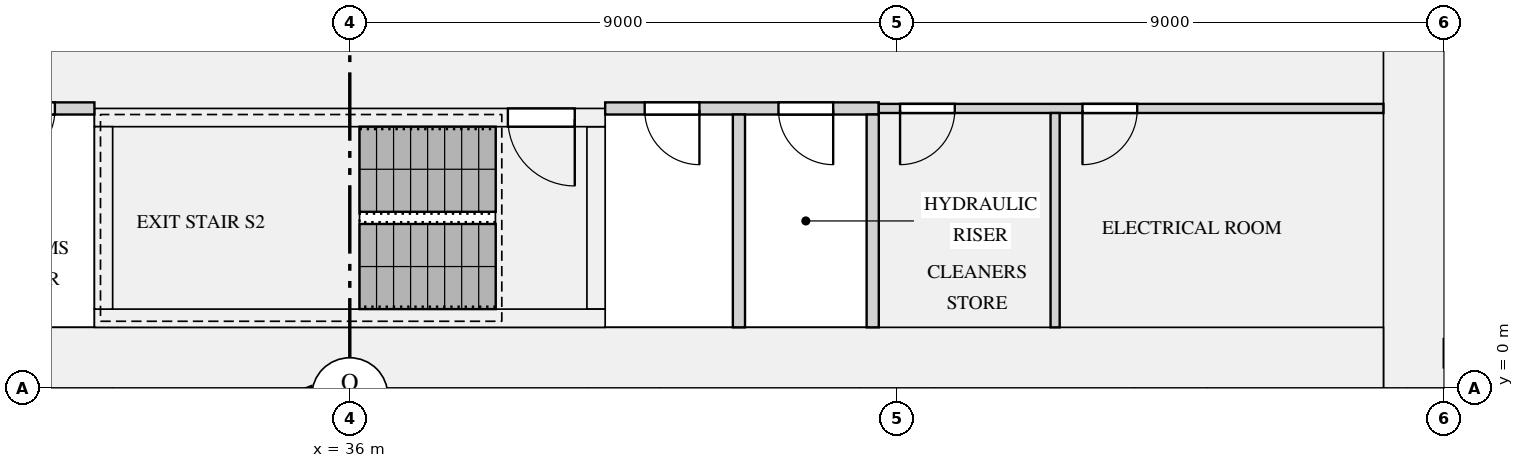
"""IFC4 building model, lengths in metres.
Left out: names, types, materials, properties, quantities, classifications, styles, units other than length and angle.
Written with IfcOpenShell. Run it as: python <this file> out.ifc"""

import sys

from ifc_helpers import new_model, si_unit, direction, frame, frame_2d, origin, place, context, subcontext, project, spatial, rectangle, extrude, element, fill, save


model = new_model("IFC4")
c1 = context("Model", 3, precision=1e-05, world=origin(), true_north=direction((0.0, 1.0)))
c2 = subcontext(c1, "Body", "Model", "MODEL_VIEW")
j1 = project(units=[si_unit("LENGTHUNIT", "METRE"), si_unit("PLANEANGLEUNIT", "RADIAN")], contexts=[c1])
p1 = place(None, origin())
s1 = spatial("IfcSite", under=j1, at=p1, CompositionType="ELEMENT")
p2 = place(p1, origin())
s2 = spatial("IfcBuilding", under=s1, at=p2, CompositionType="ELEMENT")
p3 = place(p2, frame((0.0, 0.0, 19.5)))
s3 = spatial("IfcBuildingStorey", under=s2, at=p3, CompositionType="ELEMENT", Elevation=19.5)
p4 = place(p3, frame((53.5, 0.0, 0.0), z_axis=(0.0, 0.0, 1.0), x_axis=(0.0, 1.0, 0.0)))
e1 = element("IfcWall", 1, at=p4, inside=s3, PredefinedType="SHEAR", context=c2, shape_type="SweptSolid", body=[
    extrude(rectangle(XDim=12.5, YDim=1.0, at=frame_2d((6.25, 0.0))), origin(), (0.0, 0.0, 1.0), 3.15),
])
p5 = place(p3, frame((19.0, 0.5, 0.0), z_axis=(0.0, 0.0, 1.0), x_axis=(1.0, 0.0, 0.0)))
e2 = element("IfcWall", 2, at=p5, inside=s3, PredefinedType="SHEAR", context=c2, shape_type="SweptSolid", body=[
    extrude(rectangle(XDim=34.0, YDim=1.0, at=frame_2d((17.0, 0.0))), origin(), (0.0, 0.0, 1.0), 3.15),
])
p6 = place(p3, frame((31.8, 1.15, 0.0), z_axis=(0.0, 0.0, 1.0), x_axis=(1.0, 0.0, 0.0)))
e3 = element("IfcWall", 3, at=p6, inside=s3, PredefinedType="SHEAR", context=c2, shape_type="SweptSolid", body=[
    extrude(rectangle(XDim=8.4, YDim=0.3, at=frame_2d((4.2, 0.0))), origin(), (0.0, 0.0, 1.0), 3.15),
])
p7 = place(p3, frame((31.8, 4.45, 0.0), z_axis=(0.0, 0.0, 1.0), x_axis=(1.0, 0.0, 0.0)))
e4 = element("IfcWall", 4, at=p7, inside=s3, PredefinedType="SHEAR", context=c2, shape_type="SweptSolid", body=[
    extrude(rectangle(XDim=8.4, YDim=0.3, at=frame_2d((4.2, 0.0))), origin(), (0.0, 0.0, 1.0), 3.15),
])
p8 = place(p7, frame((6.8, 0.0, 0.0)))
e5 = element("IfcOpeningElement", 5, at=p8, cuts=e4, PredefinedType="OPENING", context=c2, shape_type="SweptSolid", body=[
    extrude(rectangle(XDim=1.1, YDim=2.1, at=frame_2d((0.55, 1.05))), frame((0.0, 0.16, 0.0), z_axis=(0.0, -1.0, 0.0), x_axis=(1.0, 0.0, 0.0)), (0.0, 0.0, 1.0), 0.32),
])
for number, where, z_axis, x_axis in (
    (6, (31.95, 1.3, 0.0), (0.0, 0.0, 1.0), (0.0, 1.0, 0.0)),
    (7, (40.05, 1.3, 0.0), (0.0, 0.0, 1.0), (0.0, 1.0, 0.0)),
):
    element("IfcWall", number, at=place(p3, frame(where, z_axis=z_axis, x_axis=x_axis)), inside=s3, PredefinedType="SHEAR", context=c2, shape_type="SweptSolid", body=[
        extrude(rectangle(XDim=3.0, YDim=0.3, at=frame_2d((1.5, 0.0))), origin(), (0.0, 0.0, 1.0), 3.15),
    ])
p9 = place(p3, frame((27.3, 4.6, 0.0), z_axis=(0.0, 0.0, 1.0), x_axis=(1.0, 0.0, 0.0)))
e8 = element("IfcWall", 8, at=p9, inside=s3, PredefinedType="PARTITIONING", context=c2, shape_type="SweptSolid", body=[
    extrude(rectangle(XDim=4.5, YDim=0.2, at=frame_2d((2.25, 0.0))), origin(), (0.0, 0.0, 1.0), 2.83),
])
p10 = place(p9, frame((0.75, 0.0, 0.0)))
e9 = element("IfcOpeningElement", 9, at=p10, cuts=e8, PredefinedType="OPENING", context=c2, shape_type="SweptSolid", body=[
    extrude(rectangle(XDim=0.9, YDim=2.1, at=frame_2d((0.45, 1.05))), frame((0.0, 0.11, 0.0), z_axis=(0.0, -1.0, 0.0), x_axis=(1.0, 0.0, 0.0)), (0.0, 0.0, 1.0), 0.22),
])
p11 = place(p9, frame((2.95, 0.0, 0.0)))
e10 = element("IfcOpeningElement", 10, at=p11, cuts=e8, PredefinedType="OPENING", context=c2, shape_type="SweptSolid", body=[
    extrude(rectangle(XDim=0.9, YDim=2.1, at=frame_2d((0.45, 1.05))), frame((0.0, 0.11, 0.0), z_axis=(0.0, -1.0, 0.0), x_axis=(1.0, 0.0, 0.0)), (0.0, 0.0, 1.0), 0.22),
])
p12 = place(p3, frame((40.2, 4.6, 0.0), z_axis=(0.0, 0.0, 1.0), x_axis=(1.0, 0.0, 0.0)))
e11 = element("IfcWall", 11, at=p12, inside=s3, PredefinedType="PARTITIONING", context=c2, shape_type="SweptSolid", body=[
    extrude(rectangle(XDim=4.5, YDim=0.2, at=frame_2d((2.25, 0.0))), origin(), (0.0, 0.0, 1.0), 2.83),
])
p13 = place(p12, frame((0.65, 0.0, 0.0)))
e12 = element("IfcOpeningElement", 12, at=p13, cuts=e11, PredefinedType="OPENING", context=c2, shape_type="SweptSolid", body=[
    extrude(rectangle(XDim=0.9, YDim=2.1, at=frame_2d((0.45, 1.05))), frame((0.0, 0.11, 0.0), z_axis=(0.0, -1.0, 0.0), x_axis=(1.0, 0.0, 0.0)), (0.0, 0.0, 1.0), 0.22),
])
p14 = place(p12, frame((2.85, 0.0, 0.0)))
e13 = element("IfcOpeningElement", 13, at=p14, cuts=e11, PredefinedType="OPENING", context=c2, shape_type="SweptSolid", body=[
    extrude(rectangle(XDim=0.9, YDim=2.1, at=frame_2d((0.45, 1.05))), frame((0.0, 0.11, 0.0), z_axis=(0.0, -1.0, 0.0), x_axis=(1.0, 0.0, 0.0)), (0.0, 0.0, 1.0), 0.22),
])
p15 = place(p3, frame((44.7, 4.6, 0.0), z_axis=(0.0, 0.0, 1.0), x_axis=(1.0, 0.0, 0.0)))
e14 = element("IfcWall", 14, at=p15, inside=s3, PredefinedType="PARTITIONING", context=c2, shape_type="SweptSolid", body=[
    extrude(rectangle(XDim=8.3, YDim=0.15, at=frame_2d((4.15, 0.0))), origin(), (0.0, 0.0, 1.0), 2.83),
])
p16 = place(p15, frame((0.35, 0.0, 0.0)))
e15 = element("IfcOpeningElement", 15, at=p16, cuts=e14, PredefinedType="OPENING", context=c2, shape_type="SweptSolid", body=[
    extrude(rectangle(XDim=0.9, YDim=2.1, at=frame_2d((0.45, 1.05))), frame((0.0, 0.085, 0.0), z_axis=(0.0, -1.0, 0.0), x_axis=(1.0, 0.0, 0.0)), (0.0, 0.0, 1.0), 0.17),
])
p17 = place(p15, frame((3.35, 0.0, 0.0)))
e16 = element("IfcOpeningElement", 16, at=p17, cuts=e14, PredefinedType="OPENING", context=c2, shape_type="SweptSolid", body=[
    extrude(rectangle(XDim=0.9, YDim=2.1, at=frame_2d((0.45, 1.05))), frame((0.0, 0.085, 0.0), z_axis=(0.0, -1.0, 0.0), x_axis=(1.0, 0.0, 0.0)), (0.0, 0.0, 1.0), 0.17),
])
for number, where, z_axis, x_axis in (
    (17, (42.4, 1.0, 0.0), (0.0, 0.0, 1.0), (0.0, 1.0, 0.0)),
    (18, (44.6, 1.0, 0.0), (0.0, 0.0, 1.0), (0.0, 1.0, 0.0)),
):
    element("IfcWall", number, at=place(p3, frame(where, z_axis=z_axis, x_axis=x_axis)), inside=s3, PredefinedType="PARTITIONING", context=c2, shape_type="SweptSolid", body=[
        extrude(rectangle(XDim=3.5, YDim=0.2, at=frame_2d((1.75, 0.0))), origin(), (0.0, 0.0, 1.0), 2.83),
    ])
p18 = place(p3, frame((47.6, 1.0, 0.0), z_axis=(0.0, 0.0, 1.0), x_axis=(0.0, 1.0, 0.0)))
e19 = element("IfcWall", 19, at=p18, inside=s3, PredefinedType="PARTITIONING", context=c2, shape_type="SweptSolid", body=[
    extrude(rectangle(XDim=3.525, YDim=0.15, at=frame_2d((1.762, 0.0))), origin(), (0.0, 0.0, 1.0), 2.83),
])
p19 = place(p8, frame((1.1, 0.0, 0.0), z_axis=(0.0, 0.0, 1.0), x_axis=(-1.0, 0.0, 0.0)))
e20 = element("IfcDoor", 20, at=p19, inside=s3, OperationType="SINGLE_SWING_LEFT", PredefinedType="DOOR", context=c2, shape_type="SweptSolid", body=[
    extrude(rectangle(XDim=1.1, YDim=2.1, at=frame_2d((0.55, 1.05))), frame((0.0, 0.025, 0.0), z_axis=(0.0, -1.0, 0.0), x_axis=(1.0, 0.0, 0.0)), (0.0, 0.0, 1.0), 0.05),
])
fill(e5, e20)
p20 = place(p16, frame((0.9, 0.0, 0.0), z_axis=(0.0, 0.0, 1.0), x_axis=(-1.0, 0.0, 0.0)))
e21 = element("IfcDoor", 21, at=p20, inside=s3, OperationType="SINGLE_SWING_RIGHT", PredefinedType="DOOR", context=c2, shape_type="SweptSolid", body=[
    extrude(rectangle(XDim=0.9, YDim=2.1, at=frame_2d((0.45, 1.05))), frame((0.0, 0.025, 0.0), z_axis=(0.0, -1.0, 0.0), x_axis=(1.0, 0.0, 0.0)), (0.0, 0.0, 1.0), 0.05),
])
fill(e15, e21)
p21 = place(p17, frame((0.9, 0.0, 0.0), z_axis=(0.0, 0.0, 1.0), x_axis=(-1.0, 0.0, 0.0)))
e22 = element("IfcDoor", 22, at=p21, inside=s3, OperationType="SINGLE_SWING_RIGHT", PredefinedType="DOOR", context=c2, shape_type="SweptSolid", body=[
    extrude(rectangle(XDim=0.9, YDim=2.1, at=frame_2d((0.45, 1.05))), frame((0.0, 0.025, 0.0), z_axis=(0.0, -1.0, 0.0), x_axis=(1.0, 0.0, 0.0)), (0.0, 0.0, 1.0), 0.05),
])
fill(e16, e22)
p22 = place(p11, frame((0.9, 0.0, 0.0), z_axis=(0.0, 0.0, 1.0), x_axis=(-1.0, 0.0, 0.0)))
e23 = element("IfcDoor", 23, at=p22, inside=s3, OperationType="SINGLE_SWING_RIGHT", PredefinedType="DOOR", context=c2, shape_type="SweptSolid", body=[
    extrude(rectangle(XDim=0.9, YDim=2.1, at=frame_2d((0.45, 1.05))), frame((0.0, 0.025, 0.0), z_axis=(0.0, -1.0, 0.0), x_axis=(1.0, 0.0, 0.0)), (0.0, 0.0, 1.0), 0.05),
])
fill(e10, e23)
p23 = place(p13, frame((0.9, 0.0, 0.0), z_axis=(0.0, 0.0, 1.0), x_axis=(-1.0, 0.0, 0.0)))
e24 = element("IfcDoor", 24, at=p23, inside=s3, OperationType="SINGLE_SWING_LEFT", PredefinedType="DOOR", context=c2, shape_type="SweptSolid", body=[
    extrude(rectangle(XDim=0.9, YDim=2.1, at=frame_2d((0.45, 1.05))), frame((0.0, 0.025, 0.0), z_axis=(0.0, -1.0, 0.0), x_axis=(1.0, 0.0, 0.0)), (0.0, 0.0, 1.0), 0.05),
])
fill(e12, e24)
p24 = place(p14, frame((0.9, 0.0, 0.0), z_axis=(0.0, 0.0, 1.0), x_axis=(-1.0, 0.0, 0.0)))
e25 = element("IfcDoor", 25, at=p24, inside=s3, OperationType="SINGLE_SWING_LEFT", PredefinedType="DOOR", context=c2, shape_type="SweptSolid", body=[
    extrude(rectangle(XDim=0.9, YDim=2.1, at=frame_2d((0.45, 1.05))), frame((0.0, 0.025, 0.0), z_axis=(0.0, -1.0, 0.0), x_axis=(1.0, 0.0, 0.0)), (0.0, 0.0, 1.0), 0.05),
])
fill(e13, e25)
save(model, sys.argv[1])
